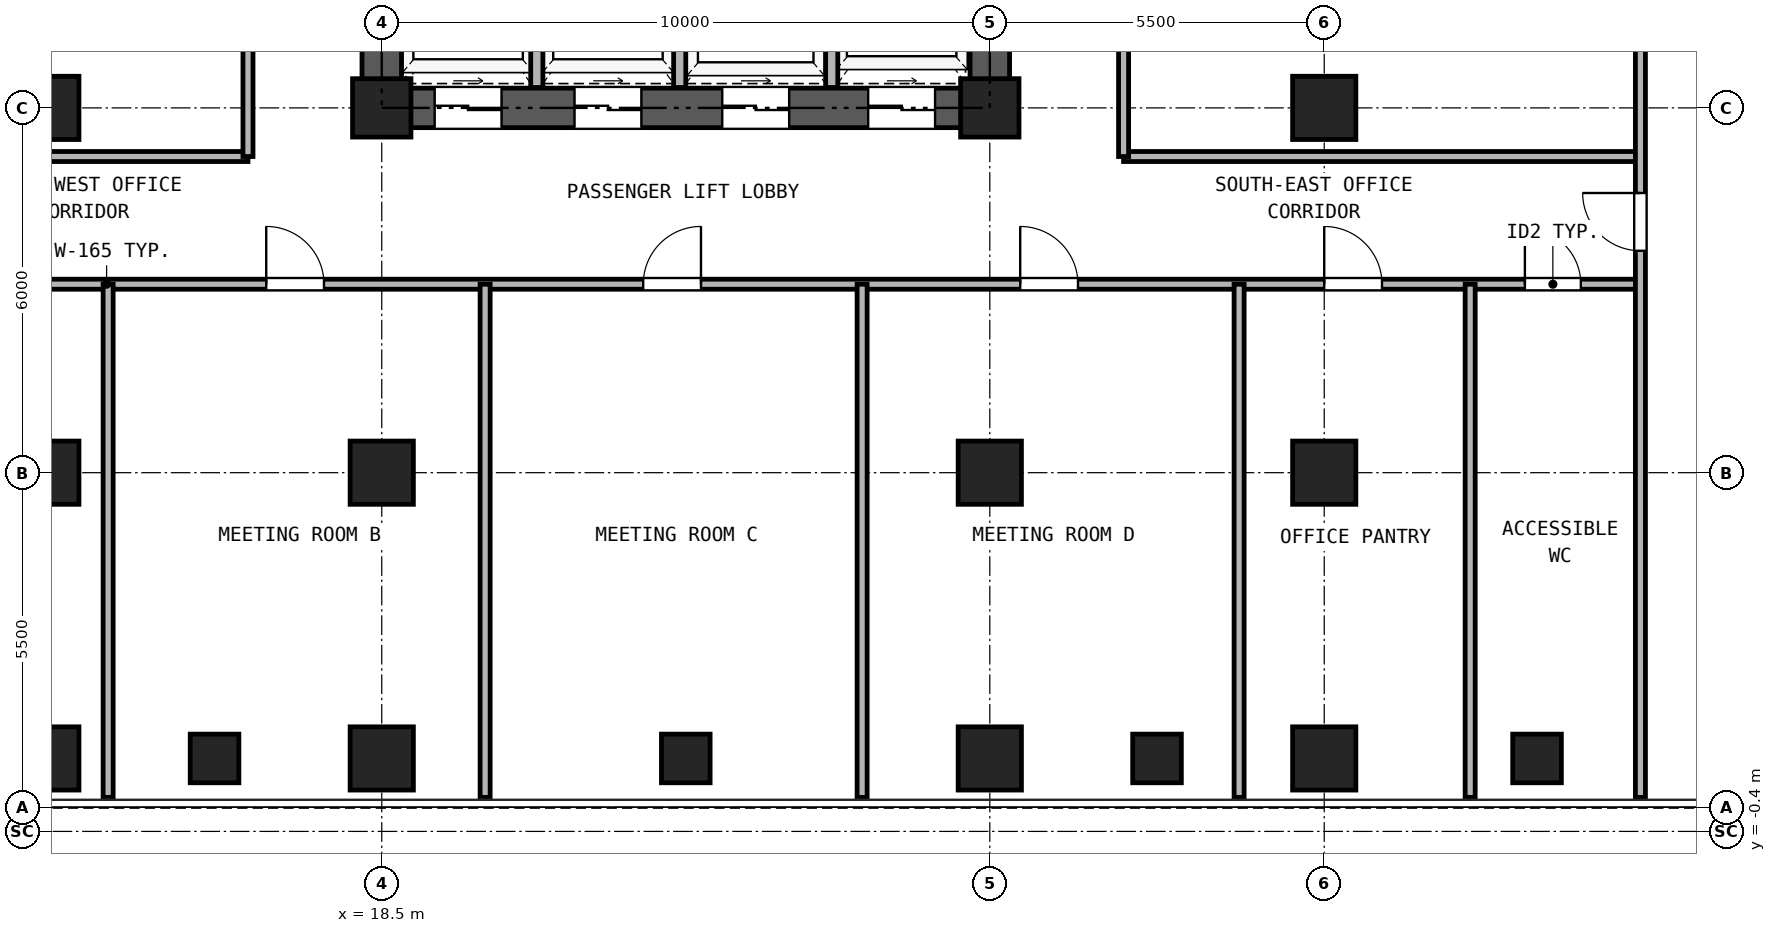
"""IFC4 building model, lengths in metres.
Left out: names, types, materials, properties, quantities, classifications, styles, units other than length and angle.
Written with IfcOpenShell. Run it as: python <this file> out.ifc"""

import sys

from ifc_helpers import new_model, si_unit, direction, frame, frame_2d, origin, origin_2d, place, context, subcontext, project, spatial, rectangle, hollow_rectangle, extrude, source, transform, mapped, element, fill, save


model = new_model("IFC4")
c1 = context("Model", 3, precision=1e-05, world=origin(), true_north=direction((0.0, 1.0)))
c2 = subcontext(c1, "Body", "Model", "MODEL_VIEW")
j1 = project(units=[si_unit("LENGTHUNIT", "METRE"), si_unit("PLANEANGLEUNIT", "RADIAN")], contexts=[c1])
p1 = place(None, origin())
s1 = spatial("IfcSite", under=j1, at=p1, CompositionType="ELEMENT")
p2 = place(p1, origin())
s2 = spatial("IfcBuilding", under=s1, at=p2, CompositionType="ELEMENT")
p3 = place(p2, frame((0.0, 0.0, 69.3)))
s3 = spatial("IfcBuildingStorey", under=s2, at=p3, CompositionType="ELEMENT", Elevation=69.3)
m1 = source(origin(), c2, "Body", "SweptSolid", [
    extrude(hollow_rectangle(XDim=1.04, YDim=1.04, WallThickness=0.065, at=origin_2d()), origin(), (0.0, 0.0, 1.0), 3.32),
])
for number, where, z_axis, x_axis in (
    (1, (13.0, 0.8, 0.0), (0.0, 0.0, 1.0), (1.0, 0.0, 0.0)),
    (2, (18.5, 0.8, 0.0), (0.0, 0.0, 1.0), (1.0, 0.0, 0.0)),
    (3, (28.5, 0.8, 0.0), (0.0, 0.0, 1.0), (1.0, 0.0, 0.0)),
    (4, (34.0, 0.8, 0.0), (0.0, 0.0, 1.0), (1.0, 0.0, 0.0)),
    (5, (13.0, 5.5, 0.0), (0.0, 0.0, 1.0), (1.0, 0.0, 0.0)),
    (6, (13.0, 11.5, 0.0), (0.0, 0.0, 1.0), (1.0, 0.0, 0.0)),
    (7, (18.5, 5.5, 0.0), (0.0, 0.0, 1.0), (1.0, 0.0, 0.0)),
):
    element("IfcColumn", number, at=place(p3, frame(where, z_axis=z_axis, x_axis=x_axis)), inside=s3, PredefinedType="COLUMN", context=c2, shape_type="MappedRepresentation", body=[
        mapped(m1, transform((0.0, 0.0, 0.0), x_axis=(1.0, 0.0, 0.0), y_axis=(0.0, 1.0, 0.0), z_axis=(0.0, 0.0, 1.0), scale=1.0)),
    ])
m2 = source(origin(), c2, "Body", "SweptSolid", [
    extrude(hollow_rectangle(XDim=0.96, YDim=0.96, WallThickness=0.06, at=origin_2d()), origin(), (0.0, 0.0, 1.0), 3.32),
])
p4 = place(p3, frame((18.5, 11.5, 0.0), z_axis=(0.0, 0.0, 1.0), x_axis=(1.0, 0.0, 0.0)))
e8 = element("IfcColumn", 8, at=p4, inside=s3, PredefinedType="COLUMN", context=c2, shape_type="MappedRepresentation", body=[
    mapped(m2, transform((0.0, 0.0, 0.0), x_axis=(1.0, 0.0, 0.0), y_axis=(0.0, 1.0, 0.0), z_axis=(0.0, 0.0, 1.0), scale=1.0)),
])
p5 = place(p3, frame((28.5, 5.5, 0.0), z_axis=(0.0, 0.0, 1.0), x_axis=(1.0, 0.0, 0.0)))
e9 = element("IfcColumn", 9, at=p5, inside=s3, PredefinedType="COLUMN", context=c2, shape_type="MappedRepresentation", body=[
    mapped(m1, transform((0.0, 0.0, 0.0), x_axis=(1.0, 0.0, 0.0), y_axis=(0.0, 1.0, 0.0), z_axis=(0.0, 0.0, 1.0), scale=1.0)),
])
p6 = place(p3, frame((28.5, 11.5, 0.0), z_axis=(0.0, 0.0, 1.0), x_axis=(1.0, 0.0, 0.0)))
e10 = element("IfcColumn", 10, at=p6, inside=s3, PredefinedType="COLUMN", context=c2, shape_type="MappedRepresentation", body=[
    mapped(m2, transform((0.0, 0.0, 0.0), x_axis=(1.0, 0.0, 0.0), y_axis=(0.0, 1.0, 0.0), z_axis=(0.0, 0.0, 1.0), scale=1.0)),
])
for number, where, z_axis, x_axis in (
    (11, (34.0, 5.5, 0.0), (0.0, 0.0, 1.0), (1.0, 0.0, 0.0)),
    (12, (34.0, 11.5, 0.0), (0.0, 0.0, 1.0), (1.0, 0.0, 0.0)),
):
    element("IfcColumn", number, at=place(p3, frame(where, z_axis=z_axis, x_axis=x_axis)), inside=s3, PredefinedType="COLUMN", context=c2, shape_type="MappedRepresentation", body=[
        mapped(m1, transform((0.0, 0.0, 0.0), x_axis=(1.0, 0.0, 0.0), y_axis=(0.0, 1.0, 0.0), z_axis=(0.0, 0.0, 1.0), scale=1.0)),
    ])
m3 = source(origin(), c2, "Body", "SweptSolid", [
    extrude(hollow_rectangle(XDim=0.8, YDim=0.8, WallThickness=0.045, at=origin_2d()), origin(), (0.0, 0.0, 1.0), 3.32),
])
for number, where, z_axis, x_axis in (
    (13, (15.75, 0.8, 0.0), (0.0, 0.0, 1.0), (1.0, 0.0, 0.0)),
    (14, (23.5, 0.8, 0.0), (0.0, 0.0, 1.0), (1.0, 0.0, 0.0)),
    (15, (31.25, 0.8, 0.0), (0.0, 0.0, 1.0), (1.0, 0.0, 0.0)),
    (16, (37.5, 0.8, 0.0), (0.0, 0.0, 1.0), (1.0, 0.0, 0.0)),
):
    element("IfcColumn", number, at=place(p3, frame(where, z_axis=z_axis, x_axis=x_axis)), inside=s3, PredefinedType="COLUMN", context=c2, shape_type="MappedRepresentation", body=[
        mapped(m3, transform((0.0, 0.0, 0.0), x_axis=(1.0, 0.0, 0.0), y_axis=(0.0, 1.0, 0.0), z_axis=(0.0, 0.0, 1.0), scale=1.0)),
    ])
p7 = place(p3, frame((18.175, 11.5, 0.0), z_axis=(0.0, 0.0, 1.0), x_axis=(1.0, 0.0, 0.0)))
e17 = element("IfcWall", 17, at=p7, inside=s3, PredefinedType="SHEAR", context=c2, shape_type="SweptSolid", body=[
    extrude(rectangle(XDim=10.65, YDim=0.65, at=frame_2d((5.325, 0.0))), origin(), (0.0, 0.0, 1.0), 3.32),
])
p8 = place(p7, frame((1.195, 0.0, 0.0)))
e18 = element("IfcOpeningElement", 18, at=p8, cuts=e17, PredefinedType="OPENING", context=c2, shape_type="SweptSolid", body=[
    extrude(rectangle(XDim=1.1, YDim=2.25, at=frame_2d((0.55, 1.125))), frame((0.0, 0.335, 0.0), z_axis=(0.0, -1.0, 0.0), x_axis=(1.0, 0.0, 0.0)), (0.0, 0.0, 1.0), 0.67),
])
p9 = place(p7, frame((3.495, 0.0, 0.0)))
e19 = element("IfcOpeningElement", 19, at=p9, cuts=e17, PredefinedType="OPENING", context=c2, shape_type="SweptSolid", body=[
    extrude(rectangle(XDim=1.1, YDim=2.25, at=frame_2d((0.55, 1.125))), frame((0.0, 0.335, 0.0), z_axis=(0.0, -1.0, 0.0), x_axis=(1.0, 0.0, 0.0)), (0.0, 0.0, 1.0), 0.67),
])
p10 = place(p7, frame((5.925, 0.0, 0.0)))
e20 = element("IfcOpeningElement", 20, at=p10, cuts=e17, PredefinedType="OPENING", context=c2, shape_type="SweptSolid", body=[
    extrude(rectangle(XDim=1.1, YDim=2.25, at=frame_2d((0.55, 1.125))), frame((0.0, 0.335, 0.0), z_axis=(0.0, -1.0, 0.0), x_axis=(1.0, 0.0, 0.0)), (0.0, 0.0, 1.0), 0.67),
])
p11 = place(p7, frame((8.325, 0.0, 0.0)))
e21 = element("IfcOpeningElement", 21, at=p11, cuts=e17, PredefinedType="OPENING", context=c2, shape_type="SweptSolid", body=[
    extrude(rectangle(XDim=1.1, YDim=2.25, at=frame_2d((0.55, 1.125))), frame((0.0, 0.335, 0.0), z_axis=(0.0, -1.0, 0.0), x_axis=(1.0, 0.0, 0.0)), (0.0, 0.0, 1.0), 0.67),
])
p12 = place(p3, frame((18.5, 11.825, 0.0), z_axis=(0.0, 0.0, 1.0), x_axis=(0.0, 1.0, 0.0)))
e22 = element("IfcWall", 22, at=p12, inside=s3, PredefinedType="SHEAR", context=c2, shape_type="SweptSolid", body=[
    extrude(rectangle(XDim=16.6, YDim=0.65, at=frame_2d((8.3, 0.0))), origin(), (0.0, 0.0, 1.0), 3.32),
])
p13 = place(p12, frame((7.325, 0.0, 0.0)))
e23 = element("IfcOpeningElement", 23, at=p13, cuts=e22, PredefinedType="OPENING", context=c2, shape_type="SweptSolid", body=[
    extrude(rectangle(XDim=1.15, YDim=2.2, at=frame_2d((0.575, 1.1))), frame((0.0, 0.335, 0.0), z_axis=(0.0, -1.0, 0.0), x_axis=(1.0, 0.0, 0.0)), (0.0, 0.0, 1.0), 0.67),
])
p14 = place(p3, frame((28.5, 11.825, 0.0), z_axis=(0.0, 0.0, 1.0), x_axis=(0.0, 1.0, 0.0)))
e24 = element("IfcWall", 24, at=p14, inside=s3, PredefinedType="SHEAR", context=c2, shape_type="SweptSolid", body=[
    extrude(rectangle(XDim=16.6, YDim=0.65, at=frame_2d((8.3, 0.0))), origin(), (0.0, 0.0, 1.0), 3.32),
])
p15 = place(p14, frame((7.325, 0.0, 0.0)))
e25 = element("IfcOpeningElement", 25, at=p15, cuts=e24, PredefinedType="OPENING", context=c2, shape_type="SweptSolid", body=[
    extrude(rectangle(XDim=1.15, YDim=2.2, at=frame_2d((0.575, 1.1))), frame((0.0, 0.335, 0.0), z_axis=(0.0, -1.0, 0.0), x_axis=(1.0, 0.0, 0.0)), (0.0, 0.0, 1.0), 0.67),
])
for number, where, z_axis, x_axis in (
    (26, (21.05, 11.835, 0.0), (0.0, 0.0, 1.0), (0.0, 1.0, 0.0)),
    (27, (23.4, 11.835, 0.0), (0.0, 0.0, 1.0), (0.0, 1.0, 0.0)),
    (28, (25.9, 11.835, 0.0), (0.0, 0.0, 1.0), (0.0, 1.0, 0.0)),
):
    element("IfcWall", number, at=place(p3, frame(where, z_axis=z_axis, x_axis=x_axis)), inside=s3, PredefinedType="PARTITIONING", context=c2, shape_type="SweptSolid", body=[
        extrude(rectangle(XDim=3.165, YDim=0.2, at=frame_2d((1.583, 0.0))), origin(), (0.0, 0.0, 1.0), 3.32),
    ])
p16 = place(p3, frame((7.8, 8.6, 0.0), z_axis=(0.0, 0.0, 1.0), x_axis=(1.0, 0.0, 0.0)))
e29 = element("IfcWall", 29, at=p16, inside=s3, PredefinedType="PARTITIONING", context=c2, shape_type="SweptSolid", body=[
    extrude(rectangle(XDim=31.4, YDim=0.165, at=frame_2d((15.7, 0.0))), origin(), (0.0, 0.0, 1.0), 2.898),
])
p17 = place(p16, frame((2.6, 0.0, 0.0)))
e30 = element("IfcOpeningElement", 30, at=p17, cuts=e29, PredefinedType="OPENING", context=c2, shape_type="SweptSolid", body=[
    extrude(rectangle(XDim=0.95, YDim=2.15, at=frame_2d((0.475, 1.075))), frame((0.0, 0.093, 0.0), z_axis=(0.0, -1.0, 0.0), x_axis=(1.0, 0.0, 0.0)), (0.0, 0.0, 1.0), 0.185),
])
p18 = place(p16, frame((8.8, 0.0, 0.0)))
e31 = element("IfcOpeningElement", 31, at=p18, cuts=e29, PredefinedType="OPENING", context=c2, shape_type="SweptSolid", body=[
    extrude(rectangle(XDim=0.95, YDim=2.15, at=frame_2d((0.475, 1.075))), frame((0.0, 0.093, 0.0), z_axis=(0.0, -1.0, 0.0), x_axis=(1.0, 0.0, 0.0)), (0.0, 0.0, 1.0), 0.185),
])
p19 = place(p16, frame((15.0, 0.0, 0.0)))
e32 = element("IfcOpeningElement", 32, at=p19, cuts=e29, PredefinedType="OPENING", context=c2, shape_type="SweptSolid", body=[
    extrude(rectangle(XDim=0.95, YDim=2.15, at=frame_2d((0.475, 1.075))), frame((0.0, 0.093, 0.0), z_axis=(0.0, -1.0, 0.0), x_axis=(1.0, 0.0, 0.0)), (0.0, 0.0, 1.0), 0.185),
])
p20 = place(p16, frame((21.2, 0.0, 0.0)))
e33 = element("IfcOpeningElement", 33, at=p20, cuts=e29, PredefinedType="OPENING", context=c2, shape_type="SweptSolid", body=[
    extrude(rectangle(XDim=0.95, YDim=2.15, at=frame_2d((0.475, 1.075))), frame((0.0, 0.093, 0.0), z_axis=(0.0, -1.0, 0.0), x_axis=(1.0, 0.0, 0.0)), (0.0, 0.0, 1.0), 0.185),
])
p21 = place(p16, frame((26.2, 0.0, 0.0)))
e34 = element("IfcOpeningElement", 34, at=p21, cuts=e29, PredefinedType="OPENING", context=c2, shape_type="SweptSolid", body=[
    extrude(rectangle(XDim=0.95, YDim=2.15, at=frame_2d((0.475, 1.075))), frame((0.0, 0.093, 0.0), z_axis=(0.0, -1.0, 0.0), x_axis=(1.0, 0.0, 0.0)), (0.0, 0.0, 1.0), 0.185),
])
p22 = place(p16, frame((29.5, 0.0, 0.0)))
e35 = element("IfcOpeningElement", 35, at=p22, cuts=e29, PredefinedType="OPENING", context=c2, shape_type="SweptSolid", body=[
    extrude(rectangle(XDim=0.92, YDim=2.1, at=frame_2d((0.46, 1.05))), frame((0.0, 0.093, 0.0), z_axis=(0.0, -1.0, 0.0), x_axis=(1.0, 0.0, 0.0)), (0.0, 0.0, 1.0), 0.185),
])
for number, where, z_axis, x_axis in (
    (36, (7.8, 10.7, 0.0), (0.0, 0.0, 1.0), (1.0, 0.0, 0.0)),
    (37, (30.7, 10.7, 0.0), (0.0, 0.0, 1.0), (1.0, 0.0, 0.0)),
):
    element("IfcWall", number, at=place(p3, frame(where, z_axis=z_axis, x_axis=x_axis)), inside=s3, PredefinedType="PARTITIONING", context=c2, shape_type="SweptSolid", body=[
        extrude(rectangle(XDim=8.5, YDim=0.165, at=frame_2d((4.25, 0.0))), origin(), (0.0, 0.0, 1.0), 3.32),
    ])
p23 = place(p3, frame((16.3, 10.7, 0.0), z_axis=(0.0, 0.0, 1.0), x_axis=(0.0, 1.0, 0.0)))
e38 = element("IfcWall", 38, at=p23, inside=s3, PredefinedType="PARTITIONING", context=c2, shape_type="SweptSolid", body=[
    extrude(rectangle(XDim=18.9, YDim=0.165, at=frame_2d((9.45, 0.0))), origin(), (0.0, 0.0, 1.0), 3.32),
])
p24 = place(p23, frame((5.611, 0.0, 0.0)))
e39 = element("IfcOpeningElement", 39, at=p24, cuts=e38, PredefinedType="OPENING", context=c2, shape_type="SweptSolid", body=[
    extrude(rectangle(XDim=0.95, YDim=2.15, at=frame_2d((0.475, 1.075))), frame((0.0, 0.093, 0.0), z_axis=(0.0, -1.0, 0.0), x_axis=(1.0, 0.0, 0.0)), (0.0, 0.0, 1.0), 0.185),
])
p25 = place(p23, frame((15.061, 0.0, 0.0)))
e40 = element("IfcOpeningElement", 40, at=p25, cuts=e38, PredefinedType="OPENING", context=c2, shape_type="SweptSolid", body=[
    extrude(rectangle(XDim=0.95, YDim=2.15, at=frame_2d((0.475, 1.075))), frame((0.0, 0.093, 0.0), z_axis=(0.0, -1.0, 0.0), x_axis=(1.0, 0.0, 0.0)), (0.0, 0.0, 1.0), 0.185),
])
p26 = place(p3, frame((30.7, 10.7, 0.0), z_axis=(0.0, 0.0, 1.0), x_axis=(0.0, 1.0, 0.0)))
e41 = element("IfcWall", 41, at=p26, inside=s3, PredefinedType="PARTITIONING", context=c2, shape_type="SweptSolid", body=[
    extrude(rectangle(XDim=18.9, YDim=0.165, at=frame_2d((9.45, 0.0))), origin(), (0.0, 0.0, 1.0), 3.32),
])
p27 = place(p26, frame((8.95, 0.0, 0.0)))
e42 = element("IfcOpeningElement", 42, at=p27, cuts=e41, PredefinedType="OPENING", context=c2, shape_type="SweptSolid", body=[
    extrude(rectangle(XDim=0.95, YDim=2.15, at=frame_2d((0.475, 1.075))), frame((0.0, 0.093, 0.0), z_axis=(0.0, -1.0, 0.0), x_axis=(1.0, 0.0, 0.0)), (0.0, 0.0, 1.0), 0.185),
])
p28 = place(p3, frame((39.2, 0.16, 0.0), z_axis=(0.0, 0.0, 1.0), x_axis=(0.0, 1.0, 0.0)))
e43 = element("IfcWall", 43, at=p28, inside=s3, PredefinedType="PARTITIONING", context=c2, shape_type="SweptSolid", body=[
    extrude(rectangle(XDim=40.18, YDim=0.165, at=frame_2d((20.09, 0.0))), origin(), (0.0, 0.0, 1.0), 3.32),
])
p29 = place(p28, frame((8.99, 0.0, 0.0)))
e44 = element("IfcOpeningElement", 44, at=p29, cuts=e43, PredefinedType="OPENING", context=c2, shape_type="SweptSolid", body=[
    extrude(rectangle(XDim=0.95, YDim=2.15, at=frame_2d((0.475, 1.075))), frame((0.0, 0.093, 0.0), z_axis=(0.0, -1.0, 0.0), x_axis=(1.0, 0.0, 0.0)), (0.0, 0.0, 1.0), 0.185),
])
p30 = place(p28, frame((29.99, 0.0, 0.0)))
e45 = element("IfcOpeningElement", 45, at=p30, cuts=e43, PredefinedType="OPENING", context=c2, shape_type="SweptSolid", body=[
    extrude(rectangle(XDim=0.95, YDim=2.15, at=frame_2d((0.475, 1.075))), frame((0.0, 0.093, 0.0), z_axis=(0.0, -1.0, 0.0), x_axis=(1.0, 0.0, 0.0)), (0.0, 0.0, 1.0), 0.185),
])
for number, where, z_axis, x_axis in (
    (46, (14.0, 0.16, 0.0), (0.0, 0.0, 1.0), (0.0, 1.0, 0.0)),
    (47, (20.2, 0.16, 0.0), (0.0, 0.0, 1.0), (0.0, 1.0, 0.0)),
    (48, (26.4, 0.16, 0.0), (0.0, 0.0, 1.0), (0.0, 1.0, 0.0)),
    (49, (32.6, 0.16, 0.0), (0.0, 0.0, 1.0), (0.0, 1.0, 0.0)),
    (50, (36.4, 0.16, 0.0), (0.0, 0.0, 1.0), (0.0, 1.0, 0.0)),
):
    element("IfcWall", number, at=place(p3, frame(where, z_axis=z_axis, x_axis=x_axis)), inside=s3, PredefinedType="PARTITIONING", context=c2, shape_type="SweptSolid", body=[
        extrude(rectangle(XDim=8.44, YDim=0.165, at=frame_2d((4.22, 0.0))), origin(), (0.0, 0.0, 1.0), 3.32),
    ])
p31 = place(p8, frame((1.1, 0.0, 0.0), z_axis=(0.0, 0.0, 1.0), x_axis=(-1.0, 0.0, 0.0)))
e51 = element("IfcDoor", 51, at=p31, inside=s3, OperationType="DOUBLE_DOOR_SLIDING", PredefinedType="DOOR", context=c2, shape_type="SweptSolid", body=[
    extrude(rectangle(XDim=1.1, YDim=2.25, at=frame_2d((0.55, 1.125))), frame((0.0, 0.025, 0.0), z_axis=(0.0, -1.0, 0.0), x_axis=(1.0, 0.0, 0.0)), (0.0, 0.0, 1.0), 0.05),
])
fill(e18, e51)
p32 = place(p9, frame((1.1, 0.0, 0.0), z_axis=(0.0, 0.0, 1.0), x_axis=(-1.0, 0.0, 0.0)))
e52 = element("IfcDoor", 52, at=p32, inside=s3, OperationType="DOUBLE_DOOR_SLIDING", PredefinedType="DOOR", context=c2, shape_type="SweptSolid", body=[
    extrude(rectangle(XDim=1.1, YDim=2.25, at=frame_2d((0.55, 1.125))), frame((0.0, 0.025, 0.0), z_axis=(0.0, -1.0, 0.0), x_axis=(1.0, 0.0, 0.0)), (0.0, 0.0, 1.0), 0.05),
])
fill(e19, e52)
p33 = place(p10, frame((1.1, 0.0, 0.0), z_axis=(0.0, 0.0, 1.0), x_axis=(-1.0, 0.0, 0.0)))
e53 = element("IfcDoor", 53, at=p33, inside=s3, OperationType="DOUBLE_DOOR_SLIDING", PredefinedType="DOOR", context=c2, shape_type="SweptSolid", body=[
    extrude(rectangle(XDim=1.1, YDim=2.25, at=frame_2d((0.55, 1.125))), frame((0.0, 0.025, 0.0), z_axis=(0.0, -1.0, 0.0), x_axis=(1.0, 0.0, 0.0)), (0.0, 0.0, 1.0), 0.05),
])
fill(e20, e53)
p34 = place(p11, frame((1.1, 0.0, 0.0), z_axis=(0.0, 0.0, 1.0), x_axis=(-1.0, 0.0, 0.0)))
e54 = element("IfcDoor", 54, at=p34, inside=s3, OperationType="DOUBLE_DOOR_SLIDING", PredefinedType="DOOR", context=c2, shape_type="SweptSolid", body=[
    extrude(rectangle(XDim=1.1, YDim=2.25, at=frame_2d((0.55, 1.125))), frame((0.0, 0.025, 0.0), z_axis=(0.0, -1.0, 0.0), x_axis=(1.0, 0.0, 0.0)), (0.0, 0.0, 1.0), 0.05),
])
fill(e21, e54)
p35 = place(p18, frame((0.95, 0.0, 0.0), z_axis=(0.0, 0.0, 1.0), x_axis=(-1.0, 0.0, 0.0)))
e55 = element("IfcDoor", 55, at=p35, inside=s3, OperationType="SINGLE_SWING_LEFT", PredefinedType="DOOR", context=c2, shape_type="SweptSolid", body=[
    extrude(rectangle(XDim=0.95, YDim=2.15, at=frame_2d((0.475, 1.075))), frame((0.0, 0.025, 0.0), z_axis=(0.0, -1.0, 0.0), x_axis=(1.0, 0.0, 0.0)), (0.0, 0.0, 1.0), 0.05),
])
fill(e31, e55)
p36 = place(p19, frame((0.95, 0.0, 0.0), z_axis=(0.0, 0.0, 1.0), x_axis=(-1.0, 0.0, 0.0)))
e56 = element("IfcDoor", 56, at=p36, inside=s3, OperationType="SINGLE_SWING_RIGHT", PredefinedType="DOOR", context=c2, shape_type="SweptSolid", body=[
    extrude(rectangle(XDim=0.95, YDim=2.15, at=frame_2d((0.475, 1.075))), frame((0.0, 0.025, 0.0), z_axis=(0.0, -1.0, 0.0), x_axis=(1.0, 0.0, 0.0)), (0.0, 0.0, 1.0), 0.05),
])
fill(e32, e56)
p37 = place(p20, frame((0.95, 0.0, 0.0), z_axis=(0.0, 0.0, 1.0), x_axis=(-1.0, 0.0, 0.0)))
e57 = element("IfcDoor", 57, at=p37, inside=s3, OperationType="SINGLE_SWING_LEFT", PredefinedType="DOOR", context=c2, shape_type="SweptSolid", body=[
    extrude(rectangle(XDim=0.95, YDim=2.15, at=frame_2d((0.475, 1.075))), frame((0.0, 0.025, 0.0), z_axis=(0.0, -1.0, 0.0), x_axis=(1.0, 0.0, 0.0)), (0.0, 0.0, 1.0), 0.05),
])
fill(e33, e57)
p38 = place(p21, frame((0.95, 0.0, 0.0), z_axis=(0.0, 0.0, 1.0), x_axis=(-1.0, 0.0, 0.0)))
e58 = element("IfcDoor", 58, at=p38, inside=s3, OperationType="SINGLE_SWING_LEFT", PredefinedType="DOOR", context=c2, shape_type="SweptSolid", body=[
    extrude(rectangle(XDim=0.95, YDim=2.15, at=frame_2d((0.475, 1.075))), frame((0.0, 0.025, 0.0), z_axis=(0.0, -1.0, 0.0), x_axis=(1.0, 0.0, 0.0)), (0.0, 0.0, 1.0), 0.05),
])
fill(e34, e58)
p39 = place(p22, frame((0.92, 0.0, 0.0), z_axis=(0.0, 0.0, 1.0), x_axis=(-1.0, 0.0, 0.0)))
e59 = element("IfcDoor", 59, at=p39, inside=s3, OperationType="SINGLE_SWING_LEFT", PredefinedType="DOOR", context=c2, shape_type="SweptSolid", body=[
    extrude(rectangle(XDim=0.92, YDim=2.1, at=frame_2d((0.46, 1.05))), frame((0.0, 0.025, 0.0), z_axis=(0.0, -1.0, 0.0), x_axis=(1.0, 0.0, 0.0)), (0.0, 0.0, 1.0), 0.05),
])
fill(e35, e59)
p40 = place(p29, origin())
e60 = element("IfcDoor", 60, at=p40, inside=s3, OperationType="SINGLE_SWING_RIGHT", PredefinedType="DOOR", context=c2, shape_type="SweptSolid", body=[
    extrude(rectangle(XDim=0.95, YDim=2.15, at=frame_2d((0.475, 1.075))), frame((0.0, 0.025, 0.0), z_axis=(0.0, -1.0, 0.0), x_axis=(1.0, 0.0, 0.0)), (0.0, 0.0, 1.0), 0.05),
])
fill(e44, e60)
save(model, sys.argv[1])
